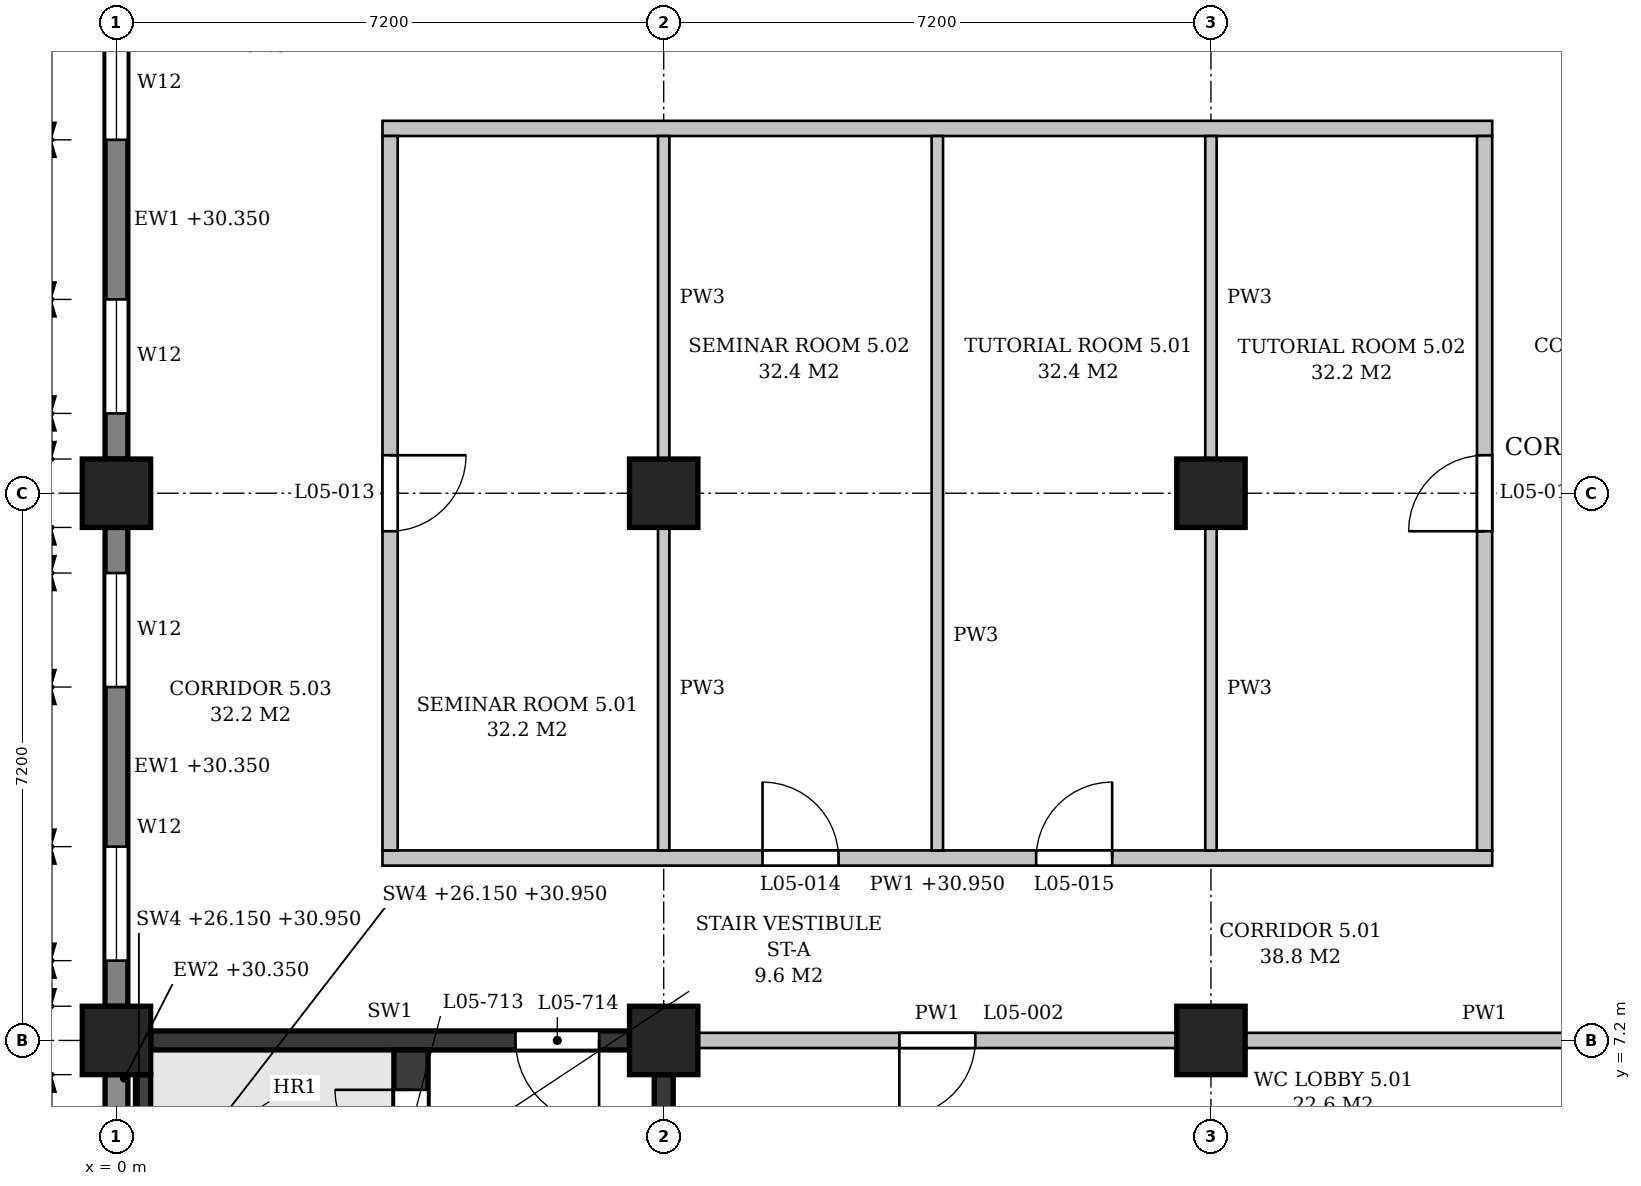
"""IFC4 building model, lengths in metres.
Left out: names, types, materials, properties, quantities, classifications, styles, units other than length and angle.
Written with IfcOpenShell. Run it as: python <this file> out.ifc"""

import sys

from ifc_helpers import new_model, si_unit, direction, frame, frame_2d, origin, origin_2d, place, context, subcontext, project, spatial, polyline, rectangle, outline, extrude, element, fill, save


model = new_model("IFC4")
c1 = context("Model", 3, precision=1e-05, world=origin(), true_north=direction((0.0, 1.0)))
c2 = subcontext(c1, "Body", "Model", "MODEL_VIEW")
j1 = project(units=[si_unit("LENGTHUNIT", "METRE"), si_unit("PLANEANGLEUNIT", "RADIAN")], contexts=[c1])
p1 = place(None, origin())
s1 = spatial("IfcSite", under=j1, at=p1, CompositionType="ELEMENT")
p2 = place(p1, origin())
s2 = spatial("IfcBuilding", under=s1, at=p2, CompositionType="ELEMENT")
p3 = place(p2, frame((0.0, 0.0, 26.4)))
s3 = spatial("IfcBuildingStorey", under=s2, at=p3, CompositionType="ELEMENT", Elevation=26.4)
for number, where, z_axis, x_axis in (
    (1, (0.0, 7.2, 0.0), (0.0, 0.0, 1.0), (1.0, 0.0, 0.0)),
    (2, (0.0, 14.4, 0.0), (0.0, 0.0, 1.0), (1.0, 0.0, 0.0)),
    (3, (7.2, 7.2, 0.0), (0.0, 0.0, 1.0), (1.0, 0.0, 0.0)),
    (4, (7.2, 14.4, 0.0), (0.0, 0.0, 1.0), (1.0, 0.0, 0.0)),
    (5, (14.4, 7.2, 0.0), (0.0, 0.0, 1.0), (1.0, 0.0, 0.0)),
    (6, (14.4, 14.4, 0.0), (0.0, 0.0, 1.0), (1.0, 0.0, 0.0)),
):
    element("IfcColumn", number, at=place(p3, frame(where, z_axis=z_axis, x_axis=x_axis)), inside=s3, PredefinedType="COLUMN", context=c2, shape_type="SweptSolid", body=[
        extrude(rectangle(XDim=0.9, YDim=0.9, at=origin_2d()), origin(), (0.0, 0.0, 1.0), 4.8),
    ])
p4 = place(p3, frame((0.0, 0.45, 0.0), z_axis=(0.0, 0.0, 1.0), x_axis=(0.0, 1.0, 0.0)))
e7 = element("IfcWall", 7, at=p4, inside=s3, PredefinedType="STANDARD", context=c2, shape_type="SweptSolid", body=[
    extrude(rectangle(XDim=6.3, YDim=0.3, at=frame_2d((3.15, 0.0))), origin(), (0.0, 0.0, 1.0), 3.95),
])
p5 = place(p4, frame((0.9, 0.0, 0.9)))
e8 = element("IfcOpeningElement", 8, at=p5, cuts=e7, PredefinedType="OPENING", context=c2, shape_type="SweptSolid", body=[
    extrude(outline(polyline([(0.0, 0.0), (0.9, 0.0), (0.9, 2.05), (0.45, 2.5), (0.0, 2.05), (0.0, 0.0)])), frame((0.0, 0.16, 0.0), z_axis=(0.0, -1.0, 0.0), x_axis=(1.0, 0.0, 0.0)), (0.0, 0.0, 1.0), 0.32),
])
p6 = place(p4, frame((4.5, 0.0, 0.9)))
e9 = element("IfcOpeningElement", 9, at=p6, cuts=e7, PredefinedType="OPENING", context=c2, shape_type="SweptSolid", body=[
    extrude(outline(polyline([(0.0, 0.0), (0.9, 0.0), (0.9, 2.05), (0.45, 2.5), (0.0, 2.05), (0.0, 0.0)])), frame((0.0, 0.16, 0.0), z_axis=(0.0, -1.0, 0.0), x_axis=(1.0, 0.0, 0.0)), (0.0, 0.0, 1.0), 0.32),
])
p7 = place(p3, frame((0.0, 7.65, 0.0), z_axis=(0.0, 0.0, 1.0), x_axis=(0.0, 1.0, 0.0)))
e10 = element("IfcWall", 10, at=p7, inside=s3, PredefinedType="STANDARD", context=c2, shape_type="SweptSolid", body=[
    extrude(rectangle(XDim=6.3, YDim=0.3, at=frame_2d((3.15, 0.0))), origin(), (0.0, 0.0, 1.0), 3.95),
])
p8 = place(p7, frame((0.6, 0.0, 0.9)))
e11 = element("IfcOpeningElement", 11, at=p8, cuts=e10, PredefinedType="OPENING", context=c2, shape_type="SweptSolid", body=[
    extrude(outline(polyline([(0.0, 0.0), (1.5, 0.0), (1.5, 1.75), (0.75, 2.5), (0.0, 1.75), (0.0, 0.0)])), frame((0.0, 0.16, 0.0), z_axis=(0.0, -1.0, 0.0), x_axis=(1.0, 0.0, 0.0)), (0.0, 0.0, 1.0), 0.32),
])
p9 = place(p7, frame((4.2, 0.0, 0.9)))
e12 = element("IfcOpeningElement", 12, at=p9, cuts=e10, PredefinedType="OPENING", context=c2, shape_type="SweptSolid", body=[
    extrude(outline(polyline([(0.0, 0.0), (1.5, 0.0), (1.5, 1.75), (0.75, 2.5), (0.0, 1.75), (0.0, 0.0)])), frame((0.0, 0.16, 0.0), z_axis=(0.0, -1.0, 0.0), x_axis=(1.0, 0.0, 0.0)), (0.0, 0.0, 1.0), 0.32),
])
p10 = place(p3, frame((0.0, 14.85, 0.0), z_axis=(0.0, 0.0, 1.0), x_axis=(0.0, 1.0, 0.0)))
e13 = element("IfcWall", 13, at=p10, inside=s3, PredefinedType="STANDARD", context=c2, shape_type="SweptSolid", body=[
    extrude(rectangle(XDim=6.3, YDim=0.3, at=frame_2d((3.15, 0.0))), origin(), (0.0, 0.0, 1.0), 3.95),
])
p11 = place(p10, frame((0.6, 0.0, 0.9)))
e14 = element("IfcOpeningElement", 14, at=p11, cuts=e13, PredefinedType="OPENING", context=c2, shape_type="SweptSolid", body=[
    extrude(outline(polyline([(0.0, 0.0), (1.5, 0.0), (1.5, 1.75), (0.75, 2.5), (0.0, 1.75), (0.0, 0.0)])), frame((0.0, 0.16, 0.0), z_axis=(0.0, -1.0, 0.0), x_axis=(1.0, 0.0, 0.0)), (0.0, 0.0, 1.0), 0.32),
])
p12 = place(p10, frame((4.2, 0.0, 0.9)))
e15 = element("IfcOpeningElement", 15, at=p12, cuts=e13, PredefinedType="OPENING", context=c2, shape_type="SweptSolid", body=[
    extrude(outline(polyline([(0.0, 0.0), (1.5, 0.0), (1.5, 1.75), (0.75, 2.5), (0.0, 1.75), (0.0, 0.0)])), frame((0.0, 0.16, 0.0), z_axis=(0.0, -1.0, 0.0), x_axis=(1.0, 0.0, 0.0)), (0.0, 0.0, 1.0), 0.32),
])
p13 = place(p3, frame((0.45, 7.2, 0.0), z_axis=(0.0, 0.0, 1.0), x_axis=(1.0, 0.0, 0.0)))
e16 = element("IfcWall", 16, at=p13, inside=s3, PredefinedType="SHEAR", context=c2, shape_type="SweptSolid", body=[
    extrude(rectangle(XDim=6.3, YDim=0.25, at=frame_2d((3.15, 0.0))), origin(), (0.0, 0.0, 1.0), 3.8),
])
p14 = place(p13, frame((4.8, 0.0, 0.0)))
e17 = element("IfcOpeningElement", 17, at=p14, cuts=e16, PredefinedType="OPENING", context=c2, shape_type="SweptSolid", body=[
    extrude(rectangle(XDim=1.1, YDim=2.1, at=frame_2d((0.55, 1.05))), frame((0.0, 0.135, 0.0), z_axis=(0.0, -1.0, 0.0), x_axis=(1.0, 0.0, 0.0)), (0.0, 0.0, 1.0), 0.27),
])
p15 = place(p3, frame((7.2, 0.45, 0.0), z_axis=(0.0, 0.0, 1.0), x_axis=(0.0, 1.0, 0.0)))
e18 = element("IfcWall", 18, at=p15, inside=s3, PredefinedType="SHEAR", context=c2, shape_type="SweptSolid", body=[
    extrude(rectangle(XDim=6.3, YDim=0.25, at=frame_2d((3.15, 0.0))), origin(), (0.0, 0.0, 1.0), 3.8),
])
p16 = place(p3, frame((0.35, 5.85, -0.25), z_axis=(0.0, 0.0, 1.0), x_axis=(0.0, 1.0, 0.0)))
e19 = element("IfcWall", 19, at=p16, inside=s3, PredefinedType="SHEAR", context=c2, shape_type="SweptSolid", body=[
    extrude(rectangle(XDim=0.9, YDim=0.2, at=frame_2d((0.45, 0.0))), origin(), (0.0, 0.0, 1.0), 4.8),
])
p17 = place(p3, frame((3.875, 0.225, 0.0), z_axis=(0.0, 0.0, 1.0), x_axis=(0.0, 1.0, 0.0)))
e20 = element("IfcWall", 20, at=p17, inside=s3, PredefinedType="SHEAR", context=c2, shape_type="SweptSolid", body=[
    extrude(rectangle(XDim=6.85, YDim=0.45, at=frame_2d((3.425, 0.0))), origin(), (0.0, 0.0, 1.0), 4.55),
])
p18 = place(p17, frame((5.325, 0.0, 0.0)))
e21 = element("IfcOpeningElement", 21, at=p18, cuts=e20, PredefinedType="OPENING", context=c2, shape_type="SweptSolid", body=[
    extrude(rectangle(XDim=1.0, YDim=2.1, at=frame_2d((0.5, 1.05))), frame((0.0, 0.235, 0.0), z_axis=(0.0, -1.0, 0.0), x_axis=(1.0, 0.0, 0.0)), (0.0, 0.0, 1.0), 0.47),
])
p19 = place(p3, frame((7.65, 7.2, 0.0), z_axis=(0.0, 0.0, 1.0), x_axis=(1.0, 0.0, 0.0)))
e22 = element("IfcWall", 22, at=p19, inside=s3, PredefinedType="PARTITIONING", context=c2, shape_type="SweptSolid", body=[
    extrude(rectangle(XDim=6.3, YDim=0.2, at=frame_2d((3.15, 0.0))), origin(), (0.0, 0.0, 1.0), 3.8),
])
p20 = place(p19, frame((2.65, 0.0, 0.0)))
e23 = element("IfcOpeningElement", 23, at=p20, cuts=e22, PredefinedType="OPENING", context=c2, shape_type="SweptSolid", body=[
    extrude(rectangle(XDim=1.0, YDim=2.1, at=frame_2d((0.5, 1.05))), frame((0.0, 0.11, 0.0), z_axis=(0.0, -1.0, 0.0), x_axis=(1.0, 0.0, 0.0)), (0.0, 0.0, 1.0), 0.22),
])
p21 = place(p3, frame((14.85, 7.2, 0.0), z_axis=(0.0, 0.0, 1.0), x_axis=(1.0, 0.0, 0.0)))
e24 = element("IfcWall", 24, at=p21, inside=s3, PredefinedType="PARTITIONING", context=c2, shape_type="SweptSolid", body=[
    extrude(rectangle(XDim=6.3, YDim=0.2, at=frame_2d((3.15, 0.0))), origin(), (0.0, 0.0, 1.0), 3.8),
])
p22 = place(p21, frame((4.225, 0.0, 0.0)))
e25 = element("IfcOpeningElement", 25, at=p22, cuts=e24, PredefinedType="OPENING", context=c2, shape_type="SweptSolid", body=[
    extrude(rectangle(XDim=1.0, YDim=2.1, at=frame_2d((0.5, 1.05))), frame((0.0, 0.11, 0.0), z_axis=(0.0, -1.0, 0.0), x_axis=(1.0, 0.0, 0.0)), (0.0, 0.0, 1.0), 0.22),
])
p23 = place(p3, frame((3.5, 9.6, 0.0), z_axis=(0.0, 0.0, 1.0), x_axis=(1.0, 0.0, 0.0)))
e26 = element("IfcWall", 26, at=p23, inside=s3, PredefinedType="PARTITIONING", context=c2, shape_type="SweptSolid", body=[
    extrude(outline(polyline([(0.0, 0.0), (14.6, 0.0), (14.6, 4.55), (11.15, 4.55), (11.15, 3.8), (10.65, 3.8), (10.65, 4.55), (3.95, 4.55), (3.95, 3.8), (3.45, 3.8), (3.45, 4.55), (0.0, 4.55), (0.0, 0.0)])), frame((0.0, 0.1, 0.0), z_axis=(0.0, -1.0, 0.0), x_axis=(1.0, 0.0, 0.0)), (0.0, 0.0, 1.0), 0.2),
])
p24 = place(p23, frame((5.0, 0.0, 0.0)))
e27 = element("IfcOpeningElement", 27, at=p24, cuts=e26, PredefinedType="OPENING", context=c2, shape_type="SweptSolid", body=[
    extrude(rectangle(XDim=1.0, YDim=2.1, at=frame_2d((0.5, 1.05))), frame((0.0, 0.11, 0.0), z_axis=(0.0, -1.0, 0.0), x_axis=(1.0, 0.0, 0.0)), (0.0, 0.0, 1.0), 0.22),
])
p25 = place(p23, frame((8.6, 0.0, 0.0)))
e28 = element("IfcOpeningElement", 28, at=p25, cuts=e26, PredefinedType="OPENING", context=c2, shape_type="SweptSolid", body=[
    extrude(rectangle(XDim=1.0, YDim=2.1, at=frame_2d((0.5, 1.05))), frame((0.0, 0.11, 0.0), z_axis=(0.0, -1.0, 0.0), x_axis=(1.0, 0.0, 0.0)), (0.0, 0.0, 1.0), 0.22),
])
p26 = place(p3, frame((3.5, 19.2, 0.0), z_axis=(0.0, 0.0, 1.0), x_axis=(1.0, 0.0, 0.0)))
e29 = element("IfcWall", 29, at=p26, inside=s3, PredefinedType="PARTITIONING", context=c2, shape_type="SweptSolid", body=[
    extrude(outline(polyline([(0.0, 0.0), (14.6, 0.0), (14.6, 4.55), (11.15, 4.55), (11.15, 3.8), (10.65, 3.8), (10.65, 4.55), (3.95, 4.55), (3.95, 3.8), (3.45, 3.8), (3.45, 4.55), (0.0, 4.55), (0.0, 0.0)])), frame((0.0, 0.1, 0.0), z_axis=(0.0, -1.0, 0.0), x_axis=(1.0, 0.0, 0.0)), (0.0, 0.0, 1.0), 0.2),
])
p27 = place(p3, frame((3.6, 9.7, 0.0), z_axis=(0.0, 0.0, 1.0), x_axis=(0.0, 1.0, 0.0)))
e30 = element("IfcWall", 30, at=p27, inside=s3, PredefinedType="PARTITIONING", context=c2, shape_type="SweptSolid", body=[
    extrude(outline(polyline([(0.0, 0.0), (9.4, 0.0), (9.4, 4.55), (4.95, 4.55), (4.95, 3.8), (4.45, 3.8), (4.45, 4.55), (0.0, 4.55), (0.0, 0.0)])), frame((0.0, 0.1, 0.0), z_axis=(0.0, -1.0, 0.0), x_axis=(1.0, 0.0, 0.0)), (0.0, 0.0, 1.0), 0.2),
])
p28 = place(p27, frame((4.2, 0.0, 0.0)))
e31 = element("IfcOpeningElement", 31, at=p28, cuts=e30, PredefinedType="OPENING", context=c2, shape_type="SweptSolid", body=[
    extrude(rectangle(XDim=1.0, YDim=2.1, at=frame_2d((0.5, 1.05))), frame((0.0, 0.11, 0.0), z_axis=(0.0, -1.0, 0.0), x_axis=(1.0, 0.0, 0.0)), (0.0, 0.0, 1.0), 0.22),
])
for number, where, z_axis, x_axis in (
    (32, (7.2, 9.7, 0.0), (0.0, 0.0, 1.0), (0.0, 1.0, 0.0)),
    (33, (7.2, 14.85, 0.0), (0.0, 0.0, 1.0), (0.0, 1.0, 0.0)),
):
    element("IfcWall", number, at=place(p3, frame(where, z_axis=z_axis, x_axis=x_axis)), inside=s3, PredefinedType="PARTITIONING", context=c2, shape_type="SweptSolid", body=[
        extrude(rectangle(XDim=4.25, YDim=0.15, at=frame_2d((2.125, 0.0))), origin(), (0.0, 0.0, 1.0), 3.8),
    ])
p29 = place(p3, frame((10.8, 9.7, 0.0), z_axis=(0.0, 0.0, 1.0), x_axis=(0.0, 1.0, 0.0)))
e34 = element("IfcWall", 34, at=p29, inside=s3, PredefinedType="PARTITIONING", context=c2, shape_type="SweptSolid", body=[
    extrude(rectangle(XDim=9.4, YDim=0.15, at=frame_2d((4.7, 0.0))), origin(), (0.0, 0.0, 1.0), 3.8),
])
for number, where, z_axis, x_axis in (
    (35, (14.4, 9.7, 0.0), (0.0, 0.0, 1.0), (0.0, 1.0, 0.0)),
    (36, (14.4, 14.85, 0.0), (0.0, 0.0, 1.0), (0.0, 1.0, 0.0)),
):
    element("IfcWall", number, at=place(p3, frame(where, z_axis=z_axis, x_axis=x_axis)), inside=s3, PredefinedType="PARTITIONING", context=c2, shape_type="SweptSolid", body=[
        extrude(rectangle(XDim=4.25, YDim=0.15, at=frame_2d((2.125, 0.0))), origin(), (0.0, 0.0, 1.0), 3.8),
    ])
p30 = place(p3, frame((18.0, 9.7, 0.0), z_axis=(0.0, 0.0, 1.0), x_axis=(0.0, 1.0, 0.0)))
e37 = element("IfcWall", 37, at=p30, inside=s3, PredefinedType="PARTITIONING", context=c2, shape_type="SweptSolid", body=[
    extrude(outline(polyline([(0.0, 0.0), (9.4, 0.0), (9.4, 4.55), (4.95, 4.55), (4.95, 3.8), (4.45, 3.8), (4.45, 4.55), (0.0, 4.55), (0.0, 0.0)])), frame((0.0, 0.1, 0.0), z_axis=(0.0, -1.0, 0.0), x_axis=(1.0, 0.0, 0.0)), (0.0, 0.0, 1.0), 0.2),
])
p31 = place(p30, frame((4.2, 0.0, 0.0)))
e38 = element("IfcOpeningElement", 38, at=p31, cuts=e37, PredefinedType="OPENING", context=c2, shape_type="SweptSolid", body=[
    extrude(rectangle(XDim=1.0, YDim=2.1, at=frame_2d((0.5, 1.05))), frame((0.0, 0.11, 0.0), z_axis=(0.0, -1.0, 0.0), x_axis=(1.0, 0.0, 0.0)), (0.0, 0.0, 1.0), 0.22),
])
p32 = place(p8, origin())
e39 = element("IfcWindow", 39, at=p32, inside=s3, PartitioningType="SINGLE_PANEL", PredefinedType="WINDOW", context=c2, shape_type="SweptSolid", body=[
    extrude(outline(polyline([(0.0, 0.0), (1.5, 0.0), (1.5, 1.75), (0.75, 2.5), (0.0, 1.75), (0.0, 0.0)])), frame((0.0, 0.03, 0.0), z_axis=(0.0, -1.0, 0.0), x_axis=(1.0, 0.0, 0.0)), (0.0, 0.0, 1.0), 0.06),
])
fill(e11, e39)
p33 = place(p9, origin())
e40 = element("IfcWindow", 40, at=p33, inside=s3, PartitioningType="SINGLE_PANEL", PredefinedType="WINDOW", context=c2, shape_type="SweptSolid", body=[
    extrude(outline(polyline([(0.0, 0.0), (1.5, 0.0), (1.5, 1.75), (0.75, 2.5), (0.0, 1.75), (0.0, 0.0)])), frame((0.0, 0.03, 0.0), z_axis=(0.0, -1.0, 0.0), x_axis=(1.0, 0.0, 0.0)), (0.0, 0.0, 1.0), 0.06),
])
fill(e12, e40)
p34 = place(p11, origin())
e41 = element("IfcWindow", 41, at=p34, inside=s3, PartitioningType="SINGLE_PANEL", PredefinedType="WINDOW", context=c2, shape_type="SweptSolid", body=[
    extrude(outline(polyline([(0.0, 0.0), (1.5, 0.0), (1.5, 1.75), (0.75, 2.5), (0.0, 1.75), (0.0, 0.0)])), frame((0.0, 0.03, 0.0), z_axis=(0.0, -1.0, 0.0), x_axis=(1.0, 0.0, 0.0)), (0.0, 0.0, 1.0), 0.06),
])
fill(e14, e41)
p35 = place(p12, origin())
e42 = element("IfcWindow", 42, at=p35, inside=s3, PartitioningType="SINGLE_PANEL", PredefinedType="WINDOW", context=c2, shape_type="SweptSolid", body=[
    extrude(outline(polyline([(0.0, 0.0), (1.5, 0.0), (1.5, 1.75), (0.75, 2.5), (0.0, 1.75), (0.0, 0.0)])), frame((0.0, 0.03, 0.0), z_axis=(0.0, -1.0, 0.0), x_axis=(1.0, 0.0, 0.0)), (0.0, 0.0, 1.0), 0.06),
])
fill(e15, e42)
p36 = place(p18, origin())
e43 = element("IfcDoor", 43, at=p36, inside=s3, OperationType="SINGLE_SWING_RIGHT", PredefinedType="DOOR", context=c2, shape_type="SweptSolid", body=[
    extrude(rectangle(XDim=1.0, YDim=2.1, at=frame_2d((0.5, 1.05))), frame((0.0, 0.025, 0.0), z_axis=(0.0, -1.0, 0.0), x_axis=(1.0, 0.0, 0.0)), (0.0, 0.0, 1.0), 0.05),
])
fill(e21, e43)
p37 = place(p14, frame((1.1, 0.0, 0.0), z_axis=(0.0, 0.0, 1.0), x_axis=(-1.0, 0.0, 0.0)))
e44 = element("IfcDoor", 44, at=p37, inside=s3, OperationType="SINGLE_SWING_LEFT", PredefinedType="DOOR", context=c2, shape_type="SweptSolid", body=[
    extrude(rectangle(XDim=1.1, YDim=2.1, at=frame_2d((0.55, 1.05))), frame((0.0, 0.025, 0.0), z_axis=(0.0, -1.0, 0.0), x_axis=(1.0, 0.0, 0.0)), (0.0, 0.0, 1.0), 0.05),
])
fill(e17, e44)
p38 = place(p20, frame((1.0, 0.0, 0.0), z_axis=(0.0, 0.0, 1.0), x_axis=(-1.0, 0.0, 0.0)))
e45 = element("IfcDoor", 45, at=p38, inside=s3, OperationType="SINGLE_SWING_RIGHT", PredefinedType="DOOR", context=c2, shape_type="SweptSolid", body=[
    extrude(rectangle(XDim=1.0, YDim=2.1, at=frame_2d((0.5, 1.05))), frame((0.0, 0.025, 0.0), z_axis=(0.0, -1.0, 0.0), x_axis=(1.0, 0.0, 0.0)), (0.0, 0.0, 1.0), 0.05),
])
fill(e23, e45)
p39 = place(p28, frame((1.0, 0.0, 0.0), z_axis=(0.0, 0.0, 1.0), x_axis=(-1.0, 0.0, 0.0)))
e46 = element("IfcDoor", 46, at=p39, inside=s3, OperationType="SINGLE_SWING_LEFT", PredefinedType="DOOR", context=c2, shape_type="SweptSolid", body=[
    extrude(rectangle(XDim=1.0, YDim=2.1, at=frame_2d((0.5, 1.05))), frame((0.0, 0.025, 0.0), z_axis=(0.0, -1.0, 0.0), x_axis=(1.0, 0.0, 0.0)), (0.0, 0.0, 1.0), 0.05),
])
fill(e31, e46)
p40 = place(p24, origin())
e47 = element("IfcDoor", 47, at=p40, inside=s3, OperationType="SINGLE_SWING_LEFT", PredefinedType="DOOR", context=c2, shape_type="SweptSolid", body=[
    extrude(rectangle(XDim=1.0, YDim=2.1, at=frame_2d((0.5, 1.05))), frame((0.0, 0.025, 0.0), z_axis=(0.0, -1.0, 0.0), x_axis=(1.0, 0.0, 0.0)), (0.0, 0.0, 1.0), 0.05),
])
fill(e27, e47)
p41 = place(p25, origin())
e48 = element("IfcDoor", 48, at=p41, inside=s3, OperationType="SINGLE_SWING_RIGHT", PredefinedType="DOOR", context=c2, shape_type="SweptSolid", body=[
    extrude(rectangle(XDim=1.0, YDim=2.1, at=frame_2d((0.5, 1.05))), frame((0.0, 0.025, 0.0), z_axis=(0.0, -1.0, 0.0), x_axis=(1.0, 0.0, 0.0)), (0.0, 0.0, 1.0), 0.05),
])
fill(e28, e48)
p42 = place(p31, origin())
e49 = element("IfcDoor", 49, at=p42, inside=s3, OperationType="SINGLE_SWING_LEFT", PredefinedType="DOOR", context=c2, shape_type="SweptSolid", body=[
    extrude(rectangle(XDim=1.0, YDim=2.1, at=frame_2d((0.5, 1.05))), frame((0.0, 0.025, 0.0), z_axis=(0.0, -1.0, 0.0), x_axis=(1.0, 0.0, 0.0)), (0.0, 0.0, 1.0), 0.05),
])
fill(e38, e49)
save(model, sys.argv[1])
